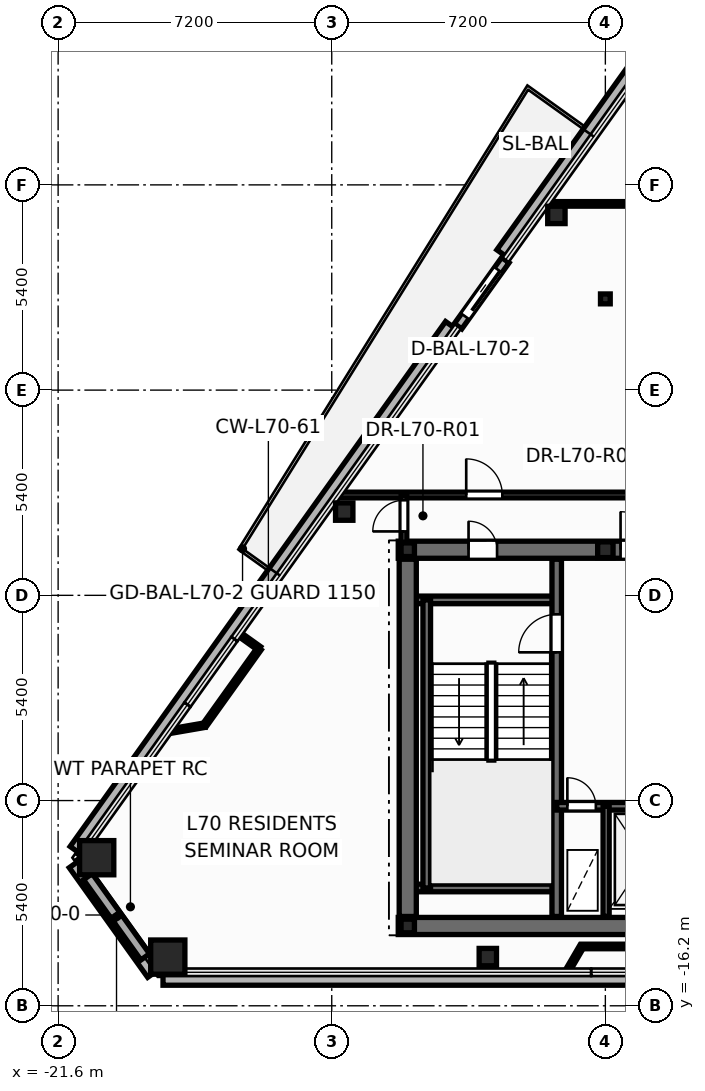
"""IFC4 building model, lengths in metres.
Left out: names, types, materials, properties, quantities, classifications, styles, units other than length and angle.
Written with IfcOpenShell. Run it as: python <this file> out.ifc"""

import sys

from ifc_helpers import new_model, si_unit, direction, frame, frame_2d, origin, origin_2d, place, context, subcontext, project, spatial, rectangle, hollow_rectangle, hollow_circle, i_section, extrude, element, fill, save


model = new_model("IFC4")
c1 = context("Model", 3, precision=1e-05, world=origin(), true_north=direction((0.0, 1.0)))
c2 = subcontext(c1, "Body", "Model", "MODEL_VIEW")
j1 = project(units=[si_unit("LENGTHUNIT", "METRE"), si_unit("PLANEANGLEUNIT", "RADIAN")], contexts=[c1])
p1 = place(None, origin())
s1 = spatial("IfcSite", under=j1, at=p1, CompositionType="ELEMENT")
p2 = place(p1, origin())
s2 = spatial("IfcBuilding", under=s1, at=p2, CompositionType="ELEMENT")
p3 = place(p2, frame((0.0, 0.0, 267.0)))
s3 = spatial("IfcBuildingStorey", under=s2, at=p3, CompositionType="ELEMENT", Elevation=267.0)
for number, where, z_axis, x_axis in (
    (1, (-20.585, -12.303, 0.0), (0.0, 0.0, 1.0), (1.0, 0.0, 0.0)),
    (2, (-18.714, -14.919, 0.0), (0.0, 0.0, 1.0), (1.0, 0.0, 0.0)),
):
    element("IfcColumn", number, at=place(p3, frame(where, z_axis=z_axis, x_axis=x_axis)), inside=s3, PredefinedType="COLUMN", context=c2, shape_type="SweptSolid", body=[
        extrude(hollow_rectangle(XDim=0.9, YDim=0.9, WallThickness=0.04, at=origin_2d()), origin(), (0.0, 0.0, 1.0), 3.6),
    ])
for number, where, z_axis, x_axis in (
    (3, (-10.293, -14.919, 0.0), (0.0, 0.0, 1.0), (1.0, 0.0, 0.0)),
    (4, (-8.489, 4.61, 0.0), (0.0, 0.0, 1.0), (1.0, 0.0, 0.0)),
    (5, (-14.072, -3.196, 0.0), (0.0, 0.0, 1.0), (1.0, 0.0, 0.0)),
):
    element("IfcColumn", number, at=place(p3, frame(where, z_axis=z_axis, x_axis=x_axis)), inside=s3, PredefinedType="COLUMN", context=c2, shape_type="SweptSolid", body=[
        extrude(hollow_circle(Radius=0.229, WallThickness=0.016, at=origin_2d()), origin(), (0.0, 0.0, 1.0), 3.6),
    ])
for number, where, z_axis, x_axis in (
    (6, (-12.4, -14.1, 0.0), (0.0, 0.0, 1.0), (1.0, 0.0, 0.0)),
    (7, (-12.4, -4.2, 0.0), (0.0, 0.0, 1.0), (1.0, 0.0, 0.0)),
):
    element("IfcColumn", number, at=place(p3, frame(where, z_axis=z_axis, x_axis=x_axis)), inside=s3, PredefinedType="COLUMN", context=c2, shape_type="SweptSolid", body=[
        extrude(i_section(OverallWidth=0.352, OverallDepth=0.359, WebThickness=0.018, FlangeThickness=0.026, at=origin_2d()), origin(), (0.0, 0.0, 1.0), 3.6),
    ])
p4 = place(p3, frame((-7.2, -4.2, 0.0), z_axis=(0.0, 0.0, 1.0), x_axis=(1.0, 0.0, 0.0)))
e8 = element("IfcColumn", 8, at=p4, inside=s3, PredefinedType="PILASTER", context=c2, shape_type="SweptSolid", body=[
    extrude(i_section(OverallWidth=0.405, OverallDepth=0.414, WebThickness=0.022, FlangeThickness=0.032, at=origin_2d()), origin(), (0.0, 0.0, 1.0), 3.6),
])
p5 = place(p3, frame((-7.2, 2.4, 0.0), z_axis=(0.0, 0.0, 1.0), x_axis=(1.0, 0.0, 0.0)))
e9 = element("IfcColumn", 9, at=p5, inside=s3, PredefinedType="COLUMN", context=c2, shape_type="SweptSolid", body=[
    extrude(i_section(OverallWidth=0.256, OverallDepth=0.26, WebThickness=0.01, FlangeThickness=0.017, at=origin_2d()), origin(), (0.0, 0.0, 1.0), 3.6),
])
p6 = place(p3, frame((-21.16, -12.462, -0.2), z_axis=(0.0, 0.0, 1.0), x_axis=(0.581765408816, -0.813356630947, 0.0)))
e10 = element("IfcWall", 10, at=p6, inside=s3, PredefinedType="PARAPET", context=c2, shape_type="SweptSolid", body=[
    extrude(rectangle(XDim=3.547, YDim=0.36, at=frame_2d((1.774, 0.0))), origin(), (0.0, 0.0, 1.0), 0.38),
])
p7 = place(p3, frame((-18.84, -15.479, -0.2), z_axis=(0.0, 0.0, 1.0), x_axis=(1.0, 0.0, 0.0)))
e11 = element("IfcWall", 11, at=p7, inside=s3, PredefinedType="PARAPET", context=c2, shape_type="SweptSolid", body=[
    extrude(rectangle(XDim=37.68, YDim=0.36, at=frame_2d((18.84, 0.0))), origin(), (0.0, 0.0, 1.0), 0.38),
])
p8 = place(p3, frame((-2.381, 14.112, -0.2), z_axis=(0.0, 0.0, 1.0), x_axis=(-0.581734227536, -0.813378932917, 0.0)))
e12 = element("IfcWall", 12, at=p8, inside=s3, PredefinedType="PARAPET", context=c2, shape_type="SweptSolid", body=[
    extrude(rectangle(XDim=12.94, YDim=0.36, at=frame_2d((6.47, 0.0))), origin(), (0.0, 0.0, 1.0), 0.38),
])
p9 = place(p3, frame((-11.258, 1.7, -0.2), z_axis=(0.0, 0.0, 1.0), x_axis=(-0.581729036712, -0.813382645405, 0.0)))
e13 = element("IfcWall", 13, at=p9, inside=s3, PredefinedType="PARAPET", context=c2, shape_type="SweptSolid", body=[
    extrude(rectangle(XDim=16.981, YDim=0.36, at=frame_2d((8.491, 0.0))), origin(), (0.0, 0.0, 1.0), 0.38),
])
p10 = place(p3, frame((-9.831, 3.42, -0.015), z_axis=(0.0, 0.0, 1.0), x_axis=(-0.581756116184, -0.81336327756, 0.0)))
e14 = element("IfcWall", 14, at=p10, inside=s3, PredefinedType="STANDARD", context=c2, shape_type="SweptSolid", body=[
    extrude(rectangle(XDim=2.14, YDim=0.24, at=frame_2d((1.07, 0.0))), origin(), (0.0, 0.0, 1.0), 2.878),
])
p11 = place(p10, frame((0.32, 0.0, 0.015)))
e15 = element("IfcOpeningElement", 15, at=p11, cuts=e14, PredefinedType="OPENING", context=c2, shape_type="SweptSolid", body=[
    extrude(rectangle(XDim=1.506, YDim=2.204, at=frame_2d((0.75, 1.102))), frame((0.0, 0.13, 0.0), z_axis=(0.0, -1.0, 0.0), x_axis=(1.0, 0.0, 0.0)), (0.0, 0.0, 1.0), 0.26),
])
p12 = place(p3, frame((-12.65, -14.1, 0.0), z_axis=(0.0, 0.0, 1.0), x_axis=(1.0, 0.0, 0.0)))
e16 = element("IfcWall", 16, at=p12, inside=s3, PredefinedType="SHEAR", context=c2, shape_type="SweptSolid", body=[
    extrude(rectangle(XDim=25.3, YDim=0.45, at=frame_2d((12.65, 0.0))), origin(), (0.0, 0.0, 1.0), 3.6),
])
p13 = place(p3, frame((-12.65, -4.2, 0.0), z_axis=(0.0, 0.0, 1.0), x_axis=(1.0, 0.0, 0.0)))
e17 = element("IfcWall", 17, at=p13, inside=s3, PredefinedType="SHEAR", context=c2, shape_type="SweptSolid", body=[
    extrude(rectangle(XDim=25.3, YDim=0.45, at=frame_2d((12.65, 0.0))), origin(), (0.0, 0.0, 1.0), 3.6),
])
p14 = place(p13, frame((1.85, 0.0, 0.0)))
e18 = element("IfcOpeningElement", 18, at=p14, cuts=e17, PredefinedType="OPENING", context=c2, shape_type="SweptSolid", body=[
    extrude(rectangle(XDim=0.756, YDim=2.054, at=frame_2d((0.375, 1.027))), frame((0.0, 0.235, 0.0), z_axis=(0.0, -1.0, 0.0), x_axis=(1.0, 0.0, 0.0)), (0.0, 0.0, 1.0), 0.47),
])
p15 = place(p13, frame((21.85, 0.0, 0.0)))
e19 = element("IfcOpeningElement", 19, at=p15, cuts=e17, PredefinedType="OPENING", context=c2, shape_type="SweptSolid", body=[
    extrude(rectangle(XDim=0.756, YDim=2.054, at=frame_2d((0.375, 1.027))), frame((0.0, 0.235, 0.0), z_axis=(0.0, -1.0, 0.0), x_axis=(1.0, 0.0, 0.0)), (0.0, 0.0, 1.0), 0.47),
])
p16 = place(p13, frame((23.5, 0.0, 0.0)))
e20 = element("IfcOpeningElement", 20, at=p16, cuts=e17, PredefinedType="OPENING", context=c2, shape_type="SweptSolid", body=[
    extrude(rectangle(XDim=0.756, YDim=2.054, at=frame_2d((0.375, 1.027))), frame((0.0, 0.235, 0.0), z_axis=(0.0, -1.0, 0.0), x_axis=(1.0, 0.0, 0.0)), (0.0, 0.0, 1.0), 0.47),
])
p17 = place(p13, frame((5.85, 0.0, 0.0)))
e21 = element("IfcOpeningElement", 21, at=p17, cuts=e17, PredefinedType="OPENING", context=c2, shape_type="SweptSolid", body=[
    extrude(rectangle(XDim=1.006, YDim=2.104, at=frame_2d((0.5, 1.052))), frame((0.0, 0.235, 0.0), z_axis=(0.0, -1.0, 0.0), x_axis=(1.0, 0.0, 0.0)), (0.0, 0.0, 1.0), 0.47),
])
p18 = place(p13, frame((10.35, 0.0, 0.0)))
e22 = element("IfcOpeningElement", 22, at=p18, cuts=e17, PredefinedType="OPENING", context=c2, shape_type="SweptSolid", body=[
    extrude(rectangle(XDim=1.406, YDim=2.154, at=frame_2d((0.7, 1.077))), frame((0.0, 0.235, 0.0), z_axis=(0.0, -1.0, 0.0), x_axis=(1.0, 0.0, 0.0)), (0.0, 0.0, 1.0), 0.47),
])
p19 = place(p13, frame((18.45, 0.0, 0.0)))
e23 = element("IfcOpeningElement", 23, at=p19, cuts=e17, PredefinedType="OPENING", context=c2, shape_type="SweptSolid", body=[
    extrude(rectangle(XDim=1.006, YDim=2.104, at=frame_2d((0.5, 1.052))), frame((0.0, 0.235, 0.0), z_axis=(0.0, -1.0, 0.0), x_axis=(1.0, 0.0, 0.0)), (0.0, 0.0, 1.0), 0.47),
])
for number, where, z_axis, x_axis in (
    (24, (-12.35, -5.52, 0.0), (0.0, 0.0, 1.0), (1.0, 0.0, 0.0)),
    (25, (-12.35, -13.1, 0.0), (0.0, 0.0, 1.0), (1.0, 0.0, 0.0)),
):
    element("IfcWall", number, at=place(p3, frame(where, z_axis=z_axis, x_axis=x_axis)), inside=s3, PredefinedType="SOLIDWALL", context=c2, shape_type="SweptSolid", body=[
        extrude(rectangle(XDim=3.87, YDim=0.2, at=frame_2d((1.935, 0.0))), origin(), (0.0, 0.0, 1.0), 3.6),
    ])
p20 = place(p3, frame((-11.9, -13.1, 0.0), z_axis=(0.0, 0.0, 1.0), x_axis=(0.0, 1.0, 0.0)))
e26 = element("IfcWall", 26, at=p20, inside=s3, PredefinedType="SOLIDWALL", context=c2, shape_type="SweptSolid", body=[
    extrude(rectangle(XDim=7.58, YDim=0.2, at=frame_2d((3.79, 0.0))), origin(), (0.0, 0.0, 1.0), 3.6),
])
p21 = place(p3, frame((-8.48, -13.85, 0.0), z_axis=(0.0, 0.0, 1.0), x_axis=(0.0, 1.0, 0.0)))
e27 = element("IfcWall", 27, at=p21, inside=s3, PredefinedType="SHEAR", context=c2, shape_type="SweptSolid", body=[
    extrude(rectangle(XDim=9.4, YDim=0.25, at=frame_2d((4.7, 0.0))), origin(), (0.0, 0.0, 1.0), 3.6),
])
p22 = place(p21, frame((6.95, 0.0, 0.0)))
e28 = element("IfcOpeningElement", 28, at=p22, cuts=e27, PredefinedType="OPENING", context=c2, shape_type="SweptSolid", body=[
    extrude(rectangle(XDim=1.006, YDim=2.104, at=frame_2d((0.5, 1.052))), frame((0.0, 0.135, 0.0), z_axis=(0.0, -1.0, 0.0), x_axis=(1.0, 0.0, 0.0)), (0.0, 0.0, 1.0), 0.27),
])
p23 = place(p3, frame((-8.48, -10.95, 0.0), z_axis=(0.0, 0.0, 1.0), x_axis=(1.0, 0.0, 0.0)))
e29 = element("IfcWall", 29, at=p23, inside=s3, PredefinedType="SOLIDWALL", context=c2, shape_type="SweptSolid", body=[
    extrude(rectangle(XDim=3.36, YDim=0.2, at=frame_2d((1.68, 0.0))), origin(), (0.0, 0.0, 1.0), 3.6),
])
p24 = place(p23, frame((0.28, 0.0, 0.0)))
e30 = element("IfcOpeningElement", 30, at=p24, cuts=e29, PredefinedType="OPENING", context=c2, shape_type="SweptSolid", body=[
    extrude(rectangle(XDim=0.756, YDim=2.054, at=frame_2d((0.375, 1.027))), frame((0.0, 0.11, 0.0), z_axis=(0.0, -1.0, 0.0), x_axis=(1.0, 0.0, 0.0)), (0.0, 0.0, 1.0), 0.22),
])
p25 = place(p23, frame((1.85, 0.0, 0.0)))
e31 = element("IfcOpeningElement", 31, at=p25, cuts=e29, PredefinedType="OPENING", context=c2, shape_type="SweptSolid", body=[
    extrude(rectangle(XDim=1.106, YDim=2.104, at=frame_2d((0.55, 1.052))), frame((0.0, 0.11, 0.0), z_axis=(0.0, -1.0, 0.0), x_axis=(1.0, 0.0, 0.0)), (0.0, 0.0, 1.0), 0.22),
])
p26 = place(p3, frame((-7.18, -13.85, 0.0), z_axis=(0.0, 0.0, 1.0), x_axis=(0.0, 1.0, 0.0)))
e32 = element("IfcWall", 32, at=p26, inside=s3, PredefinedType="PARTITIONING", context=c2, shape_type="SweptSolid", body=[
    extrude(rectangle(XDim=2.9, YDim=0.16, at=frame_2d((1.45, 0.0))), origin(), (0.0, 0.0, 1.0), 2.57),
])
p27 = place(p3, frame((-12.4, -13.85, 0.0), z_axis=(0.0, 0.0, 1.0), x_axis=(0.0, 1.0, 0.0)))
e33 = element("IfcWall", 33, at=p27, inside=s3, PredefinedType="SHEAR", context=c2, shape_type="SweptSolid", body=[
    extrude(rectangle(XDim=9.4, YDim=0.45, at=frame_2d((4.7, 0.0))), origin(), (0.0, 0.0, 1.0), 3.6),
])
p28 = place(p3, frame((-14.251, -2.76, 0.0), z_axis=(0.0, 0.0, 1.0), x_axis=(1.0, 0.0, 0.0)))
e34 = element("IfcWall", 34, at=p28, inside=s3, PredefinedType="PARTITIONING", context=c2, shape_type="SweptSolid", body=[
    extrude(rectangle(XDim=14.891, YDim=0.15, at=frame_2d((7.446, 0.0))), origin(), (0.0, 0.0, 1.0), 2.32),
])
p29 = place(p28, frame((3.39, 0.0, 0.0)))
e35 = element("IfcOpeningElement", 35, at=p29, cuts=e34, PredefinedType="OPENING", context=c2, shape_type="SweptSolid", body=[
    extrude(rectangle(XDim=0.956, YDim=2.104, at=frame_2d((0.475, 1.052))), frame((0.0, 0.085, 0.0), z_axis=(0.0, -1.0, 0.0), x_axis=(1.0, 0.0, 0.0)), (0.0, 0.0, 1.0), 0.17),
])
p30 = place(p3, frame((-8.773, 4.9, 0.0), z_axis=(0.0, 0.0, 1.0), x_axis=(1.0, 0.0, 0.0)))
e36 = element("IfcWall", 36, at=p30, inside=s3, PredefinedType="PARTITIONING", context=c2, shape_type="SweptSolid", body=[
    extrude(rectangle(XDim=9.413, YDim=0.12, at=frame_2d((4.706, 0.0))), origin(), (0.0, 0.0, 1.0), 2.32),
])
p31 = place(p3, frame((-7.822, -14.639, 0.0), z_axis=(0.0, 0.0, 1.0), x_axis=(1.0, 0.0, 0.0)))
e37 = element("IfcWall", 37, at=p31, inside=s3, PredefinedType="PARTITIONING", context=c2, shape_type="SweptSolid", body=[
    extrude(rectangle(XDim=4.493, YDim=0.12, at=frame_2d((2.247, 0.0))), origin(), (0.0, 0.0, 1.0), 3.345),
])
p32 = place(p3, frame((-16.304, -6.8, 0.0), z_axis=(0.0, 0.0, 1.0), x_axis=(-0.581750206082, -0.813367504713, 0.0)))
e38 = element("IfcWall", 38, at=p32, inside=s3, PredefinedType="PARTITIONING", context=c2, shape_type="SweptSolid", body=[
    extrude(rectangle(XDim=2.48, YDim=0.12, at=frame_2d((1.24, 0.0))), origin(), (0.0, 0.0, 1.0), 3.345),
])
p33 = place(p3, frame((-12.5, -4.24, 0.0), z_axis=(0.0, 0.0, 1.0), x_axis=(0.0, 1.0, 0.0)))
e39 = element("IfcWall", 39, at=p33, inside=s3, PredefinedType="PARTITIONING", context=c2, shape_type="SweptSolid", body=[
    extrude(rectangle(XDim=1.48, YDim=0.15, at=frame_2d((0.74, 0.0))), origin(), (0.0, 0.0, 1.0), 2.32),
])
p34 = place(p33, frame((0.522, 0.0, 0.0)))
e40 = element("IfcOpeningElement", 40, at=p34, cuts=e39, PredefinedType="OPENING", context=c2, shape_type="SweptSolid", body=[
    extrude(rectangle(XDim=0.826, YDim=2.104, at=frame_2d((0.41, 1.052))), frame((0.0, 0.085, 0.0), z_axis=(0.0, -1.0, 0.0), x_axis=(1.0, 0.0, 0.0)), (0.0, 0.0, 1.0), 0.17),
])
p35 = place(p3, frame((-17.747, -8.817, 0.0), z_axis=(0.0, 0.0, 1.0), x_axis=(-0.985373712908, -0.170407294183, 0.0)))
e41 = element("IfcWall", 41, at=p35, inside=s3, PredefinedType="PARTITIONING", context=c2, shape_type="SweptSolid", body=[
    extrude(rectangle(XDim=0.85, YDim=0.12, at=frame_2d((0.425, 0.0))), origin(), (0.0, 0.0, 1.0), 2.863),
])
p36 = place(p3, frame((-8.214, -15.309, 0.0), z_axis=(0.0, 0.0, 1.0), x_axis=(0.504887737393, 0.863185016453, 0.0)))
e42 = element("IfcWall", 42, at=p36, inside=s3, PredefinedType="PARTITIONING", context=c2, shape_type="SweptSolid", body=[
    extrude(rectangle(XDim=0.776, YDim=0.12, at=frame_2d((0.388, 0.0))), origin(), (0.0, 0.0, 1.0), 2.863),
])
p37 = place(p3, frame((-16.85, -6.41, 0.0), z_axis=(0.0, 0.0, 1.0), x_axis=(0.813561114612, -0.581479417341, 0.0)))
e43 = element("IfcWall", 43, at=p37, inside=s3, PredefinedType="PARTITIONING", context=c2, shape_type="SweptSolid", body=[
    extrude(rectangle(XDim=0.67, YDim=0.12, at=frame_2d((0.335, 0.0))), origin(), (0.0, 0.0, 1.0), 2.863),
])
p38 = place(p11, origin())
e44 = element("IfcDoor", 44, at=p38, inside=s3, OperationType="SLIDING_TO_RIGHT", PredefinedType="DOOR", context=c2, shape_type="SweptSolid", body=[
    extrude(rectangle(XDim=1.5, YDim=2.2, at=frame_2d((0.75, 1.1))), frame((0.0, 0.025, 0.0), z_axis=(0.0, -1.0, 0.0), x_axis=(1.0, 0.0, 0.0)), (0.0, 0.0, 1.0), 0.05),
])
fill(e15, e44)
p39 = place(p22, origin())
e45 = element("IfcDoor", 45, at=p39, inside=s3, OperationType="SINGLE_SWING_LEFT", PredefinedType="DOOR", context=c2, shape_type="SweptSolid", body=[
    extrude(rectangle(XDim=1.0, YDim=2.1, at=frame_2d((0.5, 1.05))), frame((0.0, 0.025, 0.0), z_axis=(0.0, -1.0, 0.0), x_axis=(1.0, 0.0, 0.0)), (0.0, 0.0, 1.0), 0.05),
])
fill(e28, e45)
p40 = place(p24, origin())
e46 = element("IfcDoor", 46, at=p40, inside=s3, OperationType="SINGLE_SWING_LEFT", PredefinedType="DOOR", context=c2, shape_type="SweptSolid", body=[
    extrude(rectangle(XDim=0.75, YDim=2.05, at=frame_2d((0.375, 1.025))), frame((0.0, 0.025, 0.0), z_axis=(0.0, -1.0, 0.0), x_axis=(1.0, 0.0, 0.0)), (0.0, 0.0, 1.0), 0.05),
])
fill(e30, e46)
p41 = place(p14, origin())
e47 = element("IfcDoor", 47, at=p41, inside=s3, OperationType="SINGLE_SWING_LEFT", PredefinedType="DOOR", context=c2, shape_type="SweptSolid", body=[
    extrude(rectangle(XDim=0.75, YDim=2.05, at=frame_2d((0.375, 1.025))), frame((0.0, 0.025, 0.0), z_axis=(0.0, -1.0, 0.0), x_axis=(1.0, 0.0, 0.0)), (0.0, 0.0, 1.0), 0.05),
])
fill(e18, e47)
p42 = place(p17, origin())
e48 = element("IfcDoor", 48, at=p42, inside=s3, OperationType="SINGLE_SWING_LEFT", PredefinedType="DOOR", context=c2, shape_type="SweptSolid", body=[
    extrude(rectangle(XDim=1.0, YDim=2.1, at=frame_2d((0.5, 1.05))), frame((0.0, 0.025, 0.0), z_axis=(0.0, -1.0, 0.0), x_axis=(1.0, 0.0, 0.0)), (0.0, 0.0, 1.0), 0.05),
])
fill(e21, e48)
p43 = place(p34, origin())
e49 = element("IfcDoor", 49, at=p43, inside=s3, OperationType="SINGLE_SWING_LEFT", PredefinedType="DOOR", context=c2, shape_type="SweptSolid", body=[
    extrude(rectangle(XDim=0.82, YDim=2.1, at=frame_2d((0.41, 1.05))), frame((0.0, 0.025, 0.0), z_axis=(0.0, -1.0, 0.0), x_axis=(1.0, 0.0, 0.0)), (0.0, 0.0, 1.0), 0.05),
])
fill(e40, e49)
p44 = place(p29, origin())
e50 = element("IfcDoor", 50, at=p44, inside=s3, OperationType="SINGLE_SWING_LEFT", PredefinedType="DOOR", context=c2, shape_type="SweptSolid", body=[
    extrude(rectangle(XDim=0.95, YDim=2.1, at=frame_2d((0.475, 1.05))), frame((0.0, 0.025, 0.0), z_axis=(0.0, -1.0, 0.0), x_axis=(1.0, 0.0, 0.0)), (0.0, 0.0, 1.0), 0.05),
])
fill(e35, e50)
save(model, sys.argv[1])
